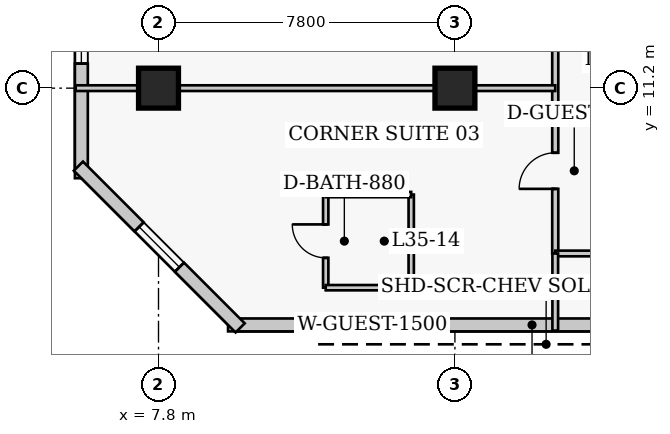
"""IFC4 building model, lengths in metres.
Left out: names, types, materials, properties, quantities, classifications, styles, units other than length and angle.
Written with IfcOpenShell. Run it as: python <this file> out.ifc"""

import sys

from ifc_helpers import new_model, si_unit, direction, frame, frame_2d, origin, origin_2d, place, context, subcontext, project, spatial, rectangle, extrude, element, fill, save


model = new_model("IFC4")
c1 = context("Model", 3, precision=1e-05, world=origin(), true_north=direction((0.0, 1.0)))
c2 = subcontext(c1, "Body", "Model", "MODEL_VIEW")
j1 = project(units=[si_unit("LENGTHUNIT", "METRE"), si_unit("PLANEANGLEUNIT", "RADIAN")], contexts=[c1])
p1 = place(None, origin())
s1 = spatial("IfcSite", under=j1, at=p1, CompositionType="ELEMENT")
p2 = place(p1, origin())
s2 = spatial("IfcBuilding", under=s1, at=p2, CompositionType="ELEMENT")
p3 = place(p2, frame((0.0, 0.0, 142.2)))
s3 = spatial("IfcBuildingStorey", under=s2, at=p3, CompositionType="ELEMENT", Elevation=142.2)
for number, where, z_axis, x_axis in (
    (1, (7.8, 11.2, 0.0), (0.0, 0.0, 1.0), (1.0, 0.0, 0.0)),
    (2, (15.6, 11.2, 0.0), (0.0, 0.0, 1.0), (1.0, 0.0, 0.0)),
):
    element("IfcColumn", number, at=place(p3, frame(where, z_axis=z_axis, x_axis=x_axis)), inside=s3, PredefinedType="COLUMN", context=c2, shape_type="SweptSolid", body=[
        extrude(rectangle(XDim=1.05, YDim=1.05, at=origin_2d()), origin(), (0.0, 0.0, 1.0), 3.8),
    ])
p4 = place(p3, frame((9.63, 4.97, 0.0), z_axis=(0.0, 0.0, 1.0), x_axis=(1.0, 0.0, 0.0)))
e3 = element("IfcWall", 3, at=p4, inside=s3, PredefinedType="SOLIDWALL", context=c2, shape_type="SweptSolid", body=[
    extrude(rectangle(XDim=26.69, YDim=0.34, at=frame_2d((13.345, 0.0))), origin(), (0.0, 0.0, 1.0), 3.55),
])
p5 = place(p4, frame((3.048, 0.0, 0.85)))
e4 = element("IfcOpeningElement", 4, at=p5, cuts=e3, PredefinedType="OPENING", context=c2, shape_type="SweptSolid", body=[
    extrude(rectangle(XDim=1.5, YDim=1.75, at=frame_2d((0.75, 0.875))), frame((0.0, 0.18, 0.0), z_axis=(0.0, -1.0, 0.0), x_axis=(1.0, 0.0, 0.0)), (0.0, 0.0, 1.0), 0.36),
])
p6 = place(p4, frame((22.642, 0.0, 0.85)))
e5 = element("IfcOpeningElement", 5, at=p6, cuts=e3, PredefinedType="OPENING", context=c2, shape_type="SweptSolid", body=[
    extrude(rectangle(XDim=1.5, YDim=1.75, at=frame_2d((0.75, 0.875))), frame((0.0, 0.18, 0.0), z_axis=(0.0, -1.0, 0.0), x_axis=(1.0, 0.0, 0.0)), (0.0, 0.0, 1.0), 0.36),
])
p7 = place(p4, frame((11.45, 0.0, 0.85)))
e6 = element("IfcOpeningElement", 6, at=p7, cuts=e3, PredefinedType="OPENING", context=c2, shape_type="SweptSolid", body=[
    extrude(rectangle(XDim=1.3, YDim=1.7, at=frame_2d((0.65, 0.85))), frame((0.0, 0.18, 0.0), z_axis=(0.0, -1.0, 0.0), x_axis=(1.0, 0.0, 0.0)), (0.0, 0.0, 1.0), 0.36),
])
p8 = place(p4, frame((17.955, 0.0, 0.85)))
e7 = element("IfcOpeningElement", 7, at=p8, cuts=e3, PredefinedType="OPENING", context=c2, shape_type="SweptSolid", body=[
    extrude(rectangle(XDim=1.3, YDim=1.7, at=frame_2d((0.65, 0.85))), frame((0.0, 0.18, 0.0), z_axis=(0.0, -1.0, 0.0), x_axis=(1.0, 0.0, 0.0)), (0.0, 0.0, 1.0), 0.36),
])
p9 = place(p3, frame((5.77, 38.97, 0.0), z_axis=(0.0, 0.0, 1.0), x_axis=(0.0, -1.0, 0.0)))
e8 = element("IfcWall", 8, at=p9, inside=s3, PredefinedType="SOLIDWALL", context=c2, shape_type="SweptSolid", body=[
    extrude(rectangle(XDim=30.14, YDim=0.34, at=frame_2d((15.07, 0.0))), origin(), (0.0, 0.0, 1.0), 3.55),
])
p10 = place(p9, frame((3.018, 0.0, 0.85)))
e9 = element("IfcOpeningElement", 9, at=p10, cuts=e8, PredefinedType="OPENING", context=c2, shape_type="SweptSolid", body=[
    extrude(rectangle(XDim=1.5, YDim=1.75, at=frame_2d((0.75, 0.875))), frame((0.0, 0.18, 0.0), z_axis=(0.0, -1.0, 0.0), x_axis=(1.0, 0.0, 0.0)), (0.0, 0.0, 1.0), 0.36),
])
p11 = place(p9, frame((10.552, 0.0, 0.85)))
e10 = element("IfcOpeningElement", 10, at=p11, cuts=e8, PredefinedType="OPENING", context=c2, shape_type="SweptSolid", body=[
    extrude(rectangle(XDim=1.5, YDim=1.75, at=frame_2d((0.75, 0.875))), frame((0.0, 0.18, 0.0), z_axis=(0.0, -1.0, 0.0), x_axis=(1.0, 0.0, 0.0)), (0.0, 0.0, 1.0), 0.36),
])
p12 = place(p9, frame((18.087, 0.0, 0.85)))
e11 = element("IfcOpeningElement", 11, at=p12, cuts=e8, PredefinedType="OPENING", context=c2, shape_type="SweptSolid", body=[
    extrude(rectangle(XDim=1.5, YDim=1.75, at=frame_2d((0.75, 0.875))), frame((0.0, 0.18, 0.0), z_axis=(0.0, -1.0, 0.0), x_axis=(1.0, 0.0, 0.0)), (0.0, 0.0, 1.0), 0.36),
])
p13 = place(p9, frame((25.623, 0.0, 0.85)))
e12 = element("IfcOpeningElement", 12, at=p13, cuts=e8, PredefinedType="OPENING", context=c2, shape_type="SweptSolid", body=[
    extrude(rectangle(XDim=1.5, YDim=1.75, at=frame_2d((0.75, 0.875))), frame((0.0, 0.18, 0.0), z_axis=(0.0, -1.0, 0.0), x_axis=(1.0, 0.0, 0.0)), (0.0, 0.0, 1.0), 0.36),
])
p14 = place(p3, frame((5.692, 9.148, 0.0), z_axis=(0.0, 0.0, 1.0), x_axis=(0.707106781187, -0.707106781187, 0.0)))
e13 = element("IfcWall", 13, at=p14, inside=s3, PredefinedType="SOLIDWALL", context=c2, shape_type="SweptSolid", body=[
    extrude(rectangle(XDim=6.02, YDim=0.34, at=frame_2d((3.01, 0.0))), origin(), (0.0, 0.0, 1.0), 3.55),
])
p15 = place(p14, frame((2.26, 0.0, 0.85)))
e14 = element("IfcOpeningElement", 14, at=p15, cuts=e13, PredefinedType="OPENING", context=c2, shape_type="SweptSolid", body=[
    extrude(rectangle(XDim=1.5, YDim=1.75, at=frame_2d((0.75, 0.875))), frame((0.0, 0.18, 0.0), z_axis=(0.0, -1.0, 0.0), x_axis=(1.0, 0.0, 0.0)), (0.0, 0.0, 1.0), 0.36),
])
p16 = place(p3, frame((18.24, 6.85, 0.0), z_axis=(0.0, 0.0, 1.0), x_axis=(0.0, 1.0, 0.0)))
e15 = element("IfcWall", 15, at=p16, inside=s3, PredefinedType="PARTITIONING", context=c2, shape_type="SweptSolid", body=[
    extrude(rectangle(XDim=33.8, YDim=0.16, at=frame_2d((16.9, 0.0))), origin(), (0.0, 0.0, 1.0), 3.55),
])
p17 = place(p16, frame((1.7, 0.0, 0.0)))
e16 = element("IfcOpeningElement", 16, at=p17, cuts=e15, PredefinedType="OPENING", context=c2, shape_type="SweptSolid", body=[
    extrude(rectangle(XDim=0.95, YDim=2.1, at=frame_2d((0.475, 1.05))), frame((0.0, 0.09, 0.0), z_axis=(0.0, -1.0, 0.0), x_axis=(1.0, 0.0, 0.0)), (0.0, 0.0, 1.0), 0.18),
])
p18 = place(p16, frame((12.675, 0.0, 0.0)))
e17 = element("IfcOpeningElement", 17, at=p18, cuts=e15, PredefinedType="OPENING", context=c2, shape_type="SweptSolid", body=[
    extrude(rectangle(XDim=0.95, YDim=2.1, at=frame_2d((0.475, 1.05))), frame((0.0, 0.09, 0.0), z_axis=(0.0, -1.0, 0.0), x_axis=(1.0, 0.0, 0.0)), (0.0, 0.0, 1.0), 0.18),
])
p19 = place(p16, frame((25.475, 0.0, 0.0)))
e18 = element("IfcOpeningElement", 18, at=p19, cuts=e15, PredefinedType="OPENING", context=c2, shape_type="SweptSolid", body=[
    extrude(rectangle(XDim=0.95, YDim=2.1, at=frame_2d((0.475, 1.05))), frame((0.0, 0.09, 0.0), z_axis=(0.0, -1.0, 0.0), x_axis=(1.0, 0.0, 0.0)), (0.0, 0.0, 1.0), 0.18),
])
p20 = place(p16, frame((31.43, 0.0, 0.0)))
e19 = element("IfcOpeningElement", 19, at=p20, cuts=e15, PredefinedType="OPENING", context=c2, shape_type="SweptSolid", body=[
    extrude(rectangle(XDim=1.0, YDim=2.15, at=frame_2d((0.5, 1.075))), frame((0.0, 0.09, 0.0), z_axis=(0.0, -1.0, 0.0), x_axis=(1.0, 0.0, 0.0)), (0.0, 0.0, 1.0), 0.18),
])
p21 = place(p3, frame((18.24, 6.85, 0.0), z_axis=(0.0, 0.0, 1.0), x_axis=(1.0, 0.0, 0.0)))
e20 = element("IfcWall", 20, at=p21, inside=s3, PredefinedType="PARTITIONING", context=c2, shape_type="SweptSolid", body=[
    extrude(rectangle(XDim=2.22, YDim=0.15, at=frame_2d((1.11, 0.0))), origin(), (0.0, 0.0, 1.0), 3.55),
])
p22 = place(p3, frame((18.24, 4.82, 0.0), z_axis=(0.0, 0.0, 1.0), x_axis=(0.0, 1.0, 0.0)))
e21 = element("IfcWall", 21, at=p22, inside=s3, PredefinedType="PARTITIONING", context=c2, shape_type="SweptSolid", body=[
    extrude(rectangle(XDim=2.03, YDim=0.15, at=frame_2d((1.015, 0.0))), origin(), (0.0, 0.0, 1.0), 3.55),
])
p23 = place(p3, frame((12.2, 5.95, 0.0), z_axis=(0.0, 0.0, 1.0), x_axis=(0.0, 1.0, 0.0)))
e22 = element("IfcWall", 22, at=p23, inside=s3, PredefinedType="PLUMBINGWALL", context=c2, shape_type="SweptSolid", body=[
    extrude(rectangle(XDim=2.45, YDim=0.14, at=frame_2d((1.225, 0.0))), origin(), (0.0, 0.0, 1.0), 3.55),
])
p24 = place(p23, frame((0.785, 0.0, 0.0)))
e23 = element("IfcOpeningElement", 23, at=p24, cuts=e22, PredefinedType="OPENING", context=c2, shape_type="SweptSolid", body=[
    extrude(rectangle(XDim=0.88, YDim=2.05, at=frame_2d((0.44, 1.025))), frame((0.0, 0.08, 0.0), z_axis=(0.0, -1.0, 0.0), x_axis=(1.0, 0.0, 0.0)), (0.0, 0.0, 1.0), 0.16),
])
p25 = place(p3, frame((14.45, 5.95, 0.0), z_axis=(0.0, 0.0, 1.0), x_axis=(0.0, 1.0, 0.0)))
e24 = element("IfcWall", 24, at=p25, inside=s3, PredefinedType="PLUMBINGWALL", context=c2, shape_type="SweptSolid", body=[
    extrude(rectangle(XDim=2.45, YDim=0.14, at=frame_2d((1.225, 0.0))), origin(), (0.0, 0.0, 1.0), 3.55),
])
for number, where, z_axis, x_axis in (
    (25, (12.2, 5.95, 0.0), (0.0, 0.0, 1.0), (1.0, 0.0, 0.0)),
    (26, (12.2, 8.4, 0.0), (0.0, 0.0, 1.0), (1.0, 0.0, 0.0)),
):
    element("IfcWall", number, at=place(p3, frame(where, z_axis=z_axis, x_axis=x_axis)), inside=s3, PredefinedType="PLUMBINGWALL", context=c2, shape_type="SweptSolid", body=[
        extrude(rectangle(XDim=2.25, YDim=0.14, at=frame_2d((1.125, 0.0))), origin(), (0.0, 0.0, 1.0), 3.55),
    ])
p26 = place(p3, frame((5.62, 11.2, 0.0), z_axis=(0.0, 0.0, 1.0), x_axis=(1.0, 0.0, 0.0)))
e27 = element("IfcWall", 27, at=p26, inside=s3, PredefinedType="PARTITIONING", context=c2, shape_type="SweptSolid", body=[
    extrude(rectangle(XDim=12.62, YDim=0.15, at=frame_2d((6.31, 0.0))), origin(), (0.0, 0.0, 1.0), 2.778),
])
p27 = place(p5, origin())
e28 = element("IfcWindow", 28, at=p27, inside=s3, PartitioningType="SINGLE_PANEL", PredefinedType="WINDOW", context=c2, shape_type="SweptSolid", body=[
    extrude(rectangle(XDim=1.5, YDim=1.75, at=frame_2d((0.75, 0.875))), frame((0.0, 0.03, 0.0), z_axis=(0.0, -1.0, 0.0), x_axis=(1.0, 0.0, 0.0)), (0.0, 0.0, 1.0), 0.06),
])
fill(e4, e28)
p28 = place(p13, origin())
e29 = element("IfcWindow", 29, at=p28, inside=s3, PartitioningType="SINGLE_PANEL", PredefinedType="WINDOW", context=c2, shape_type="SweptSolid", body=[
    extrude(rectangle(XDim=1.5, YDim=1.75, at=frame_2d((0.75, 0.875))), frame((0.0, 0.03, 0.0), z_axis=(0.0, -1.0, 0.0), x_axis=(1.0, 0.0, 0.0)), (0.0, 0.0, 1.0), 0.06),
])
fill(e12, e29)
p29 = place(p15, origin())
e30 = element("IfcWindow", 30, at=p29, inside=s3, PartitioningType="SINGLE_PANEL", PredefinedType="WINDOW", context=c2, shape_type="SweptSolid", body=[
    extrude(rectangle(XDim=1.5, YDim=1.75, at=frame_2d((0.75, 0.875))), frame((0.0, 0.03, 0.0), z_axis=(0.0, -1.0, 0.0), x_axis=(1.0, 0.0, 0.0)), (0.0, 0.0, 1.0), 0.06),
])
fill(e14, e30)
p30 = place(p24, origin())
e31 = element("IfcDoor", 31, at=p30, inside=s3, OperationType="SINGLE_SWING_RIGHT", PredefinedType="DOOR", context=c2, shape_type="SweptSolid", body=[
    extrude(rectangle(XDim=0.88, YDim=2.05, at=frame_2d((0.44, 1.025))), frame((0.0, 0.025, 0.0), z_axis=(0.0, -1.0, 0.0), x_axis=(1.0, 0.0, 0.0)), (0.0, 0.0, 1.0), 0.05),
])
fill(e23, e31)
p31 = place(p17, origin())
e32 = element("IfcDoor", 32, at=p31, inside=s3, OperationType="SINGLE_SWING_LEFT", PredefinedType="DOOR", context=c2, shape_type="SweptSolid", body=[
    extrude(rectangle(XDim=0.95, YDim=2.1, at=frame_2d((0.475, 1.05))), frame((0.0, 0.025, 0.0), z_axis=(0.0, -1.0, 0.0), x_axis=(1.0, 0.0, 0.0)), (0.0, 0.0, 1.0), 0.05),
])
fill(e16, e32)
save(model, sys.argv[1])
